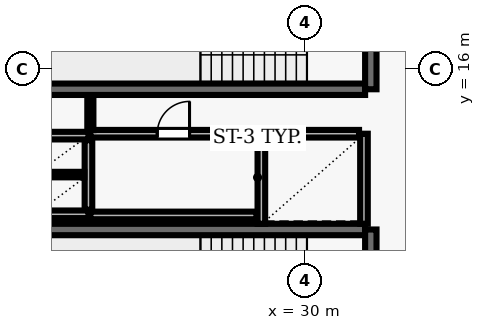
"""IFC4 building model, lengths in metres.
Left out: names, types, materials, properties, quantities, classifications, styles, units other than length and angle.
Written with IfcOpenShell. Run it as: python <this file> out.ifc"""

import sys

from ifc_helpers import new_model, si_unit, direction, frame, frame_2d, origin, place, context, subcontext, project, spatial, rectangle, extrude, element, fill, save


model = new_model("IFC4")
c1 = context("Model", 3, precision=1e-05, world=origin(), true_north=direction((0.0, 1.0)))
c2 = subcontext(c1, "Body", "Model", "MODEL_VIEW")
j1 = project(units=[si_unit("LENGTHUNIT", "METRE"), si_unit("PLANEANGLEUNIT", "RADIAN")], contexts=[c1])
p1 = place(None, origin())
s1 = spatial("IfcSite", under=j1, at=p1, CompositionType="ELEMENT")
p2 = place(p1, origin())
s2 = spatial("IfcBuilding", under=s1, at=p2, CompositionType="ELEMENT")
p3 = place(p2, frame((0.0, 0.0, 130.7)))
s3 = spatial("IfcBuildingStorey", under=s2, at=p3, CompositionType="ELEMENT", Elevation=130.7)
p4 = place(p3, frame((23.22, 15.47, 0.0), z_axis=(0.0, 0.0, 1.0), x_axis=(1.0, 0.0, 0.0)))
e1 = element("IfcWall", 1, at=p4, inside=s3, PredefinedType="SHEAR", context=c2, shape_type="SweptSolid", body=[
    extrude(rectangle(XDim=8.36, YDim=0.3, at=frame_2d((4.18, 0.0))), origin(), (0.0, 0.0, 1.0), 3.69),
])
p5 = place(p3, frame((31.73, 15.47, 0.0), z_axis=(0.0, 0.0, 1.0), x_axis=(0.0, 1.0, 0.0)))
e2 = element("IfcWall", 2, at=p5, inside=s3, PredefinedType="SHEAR", context=c2, shape_type="SweptSolid", body=[
    extrude(rectangle(XDim=3.51, YDim=0.3, at=frame_2d((1.755, 0.0))), origin(), (0.0, 0.0, 1.0), 3.69),
])
p6 = place(p5, frame((1.18, 0.0, 0.0)))
e3 = element("IfcOpeningElement", 3, at=p6, cuts=e2, PredefinedType="OPENING", context=c2, shape_type="SweptSolid", body=[
    extrude(rectangle(XDim=1.15, YDim=2.15, at=frame_2d((0.575, 1.075))), frame((0.0, 0.16, 0.0), z_axis=(0.0, -1.0, 0.0), x_axis=(1.0, 0.0, 0.0)), (0.0, 0.0, 1.0), 0.32),
])
p7 = place(p3, frame((31.58, 11.78, 0.0), z_axis=(0.0, 0.0, 1.0), x_axis=(-1.0, 0.0, 0.0)))
e4 = element("IfcWall", 4, at=p7, inside=s3, PredefinedType="SHEAR", context=c2, shape_type="SweptSolid", body=[
    extrude(rectangle(XDim=8.36, YDim=0.3, at=frame_2d((4.18, 0.0))), origin(), (0.0, 0.0, 1.0), 3.69),
])
p8 = place(p3, frame((31.73, 8.27, 0.0), z_axis=(0.0, 0.0, 1.0), x_axis=(0.0, 1.0, 0.0)))
e5 = element("IfcWall", 5, at=p8, inside=s3, PredefinedType="SHEAR", context=c2, shape_type="SweptSolid", body=[
    extrude(rectangle(XDim=3.51, YDim=0.3, at=frame_2d((1.755, 0.0))), origin(), (0.0, 0.0, 1.0), 3.69),
])
p9 = place(p8, frame((1.18, 0.0, 0.0)))
e6 = element("IfcOpeningElement", 6, at=p9, cuts=e5, PredefinedType="OPENING", context=c2, shape_type="SweptSolid", body=[
    extrude(rectangle(XDim=1.15, YDim=2.15, at=frame_2d((0.575, 1.075))), frame((0.0, 0.16, 0.0), z_axis=(0.0, -1.0, 0.0), x_axis=(1.0, 0.0, 0.0)), (0.0, 0.0, 1.0), 0.32),
])
for number, where, z_axis, x_axis in (
    (7, (28.85, 14.3, 0.0), (0.0, 0.0, 1.0), (0.0, -1.0, 0.0)),
    (8, (31.55, 11.93, 0.0), (0.0, 0.0, 1.0), (0.0, 1.0, 0.0)),
):
    element("IfcWall", number, at=place(p3, frame(where, z_axis=z_axis, x_axis=x_axis)), inside=s3, PredefinedType="SOLIDWALL", context=c2, shape_type="SweptSolid", body=[
        extrude(rectangle(XDim=2.37, YDim=0.2, at=frame_2d((1.185, 0.0))), origin(), (0.0, 0.0, 1.0), 3.69),
    ])
p10 = place(p3, frame((31.42, 14.3, 0.0), z_axis=(0.0, 0.0, 1.0), x_axis=(-1.0, 0.0, 0.0)))
e9 = element("IfcWall", 9, at=p10, inside=s3, PredefinedType="SOLIDWALL", context=c2, shape_type="SweptSolid", body=[
    extrude(rectangle(XDim=2.44, YDim=0.2, at=frame_2d((1.22, 0.0))), origin(), (0.0, 0.0, 1.0), 3.69),
])
for number, where, z_axis, x_axis in (
    (10, (22.9, 14.25, 0.0), (0.0, 0.0, 1.0), (1.0, 0.0, 0.0)),
    (11, (22.9, 12.18, 0.0), (0.0, 0.0, 1.0), (1.0, 0.0, 0.0)),
):
    element("IfcWall", number, at=place(p3, frame(where, z_axis=z_axis, x_axis=x_axis)), inside=s3, PredefinedType="SOLIDWALL", context=c2, shape_type="SweptSolid", body=[
        extrude(rectangle(XDim=1.4, YDim=0.2, at=frame_2d((0.7, 0.0))), origin(), (0.0, 0.0, 1.0), 3.69),
    ])
p11 = place(p3, frame((24.3, 12.3, 0.0), z_axis=(0.0, 0.0, 1.0), x_axis=(0.0, 1.0, 0.0)))
e12 = element("IfcWall", 12, at=p11, inside=s3, PredefinedType="SOLIDWALL", context=c2, shape_type="SweptSolid", body=[
    extrude(rectangle(XDim=1.83, YDim=0.2, at=frame_2d((0.915, 0.0))), origin(), (0.0, 0.0, 1.0), 3.69),
])
p12 = place(p3, frame((23.01, 13.225, 0.0), z_axis=(0.0, 0.0, 1.0), x_axis=(1.0, 0.0, 0.0)))
e13 = element("IfcWall", 13, at=p12, inside=s3, PredefinedType="PARTITIONING", context=c2, shape_type="SweptSolid", body=[
    extrude(rectangle(XDim=1.18, YDim=0.145, at=frame_2d((0.59, 0.0))), origin(), (0.0, 0.0, 1.0), 3.69),
])
p13 = place(p3, frame((24.35, 12.15, 0.0), z_axis=(0.0, 0.0, 1.0), x_axis=(1.0, 0.0, 0.0)))
e14 = element("IfcWall", 14, at=p13, inside=s3, PredefinedType="SOLIDWALL", context=c2, shape_type="SweptSolid", body=[
    extrude(rectangle(XDim=4.37, YDim=0.2, at=frame_2d((2.185, 0.0))), origin(), (0.0, 0.0, 1.0), 3.69),
])
p14 = place(p3, frame((24.35, 14.3, 0.0), z_axis=(0.0, 0.0, 1.0), x_axis=(1.0, 0.0, 0.0)))
e15 = element("IfcWall", 15, at=p14, inside=s3, PredefinedType="SOLIDWALL", context=c2, shape_type="SweptSolid", body=[
    extrude(rectangle(XDim=4.37, YDim=0.2, at=frame_2d((2.185, 0.0))), origin(), (0.0, 0.0, 1.0), 3.69),
])
p15 = place(p14, frame((1.76, 0.0, 0.0)))
e16 = element("IfcOpeningElement", 16, at=p15, cuts=e15, PredefinedType="OPENING", context=c2, shape_type="SweptSolid", body=[
    extrude(rectangle(XDim=0.85, YDim=2.1, at=frame_2d((0.425, 1.05))), frame((0.0, 0.11, 0.0), z_axis=(0.0, -1.0, 0.0), x_axis=(1.0, 0.0, 0.0)), (0.0, 0.0, 1.0), 0.22),
])
p16 = place(p3, frame((24.35, 15.29, 0.0), z_axis=(0.0, 0.0, 1.0), x_axis=(0.0, -1.0, 0.0)))
e17 = element("IfcWall", 17, at=p16, inside=s3, PredefinedType="PARTITIONING", context=c2, shape_type="SweptSolid", body=[
    extrude(rectangle(XDim=0.895, YDim=0.16, at=frame_2d((0.448, 0.0))), origin(), (0.0, 0.0, 1.0), 3.69),
])
p17 = place(p15, origin())
e18 = element("IfcDoor", 18, at=p17, inside=s3, OperationType="SINGLE_SWING_RIGHT", PredefinedType="DOOR", context=c2, shape_type="SweptSolid", body=[
    extrude(rectangle(XDim=0.85, YDim=2.1, at=frame_2d((0.425, 1.05))), frame((0.0, 0.025, 0.0), z_axis=(0.0, -1.0, 0.0), x_axis=(1.0, 0.0, 0.0)), (0.0, 0.0, 1.0), 0.05),
])
fill(e16, e18)
save(model, sys.argv[1])
